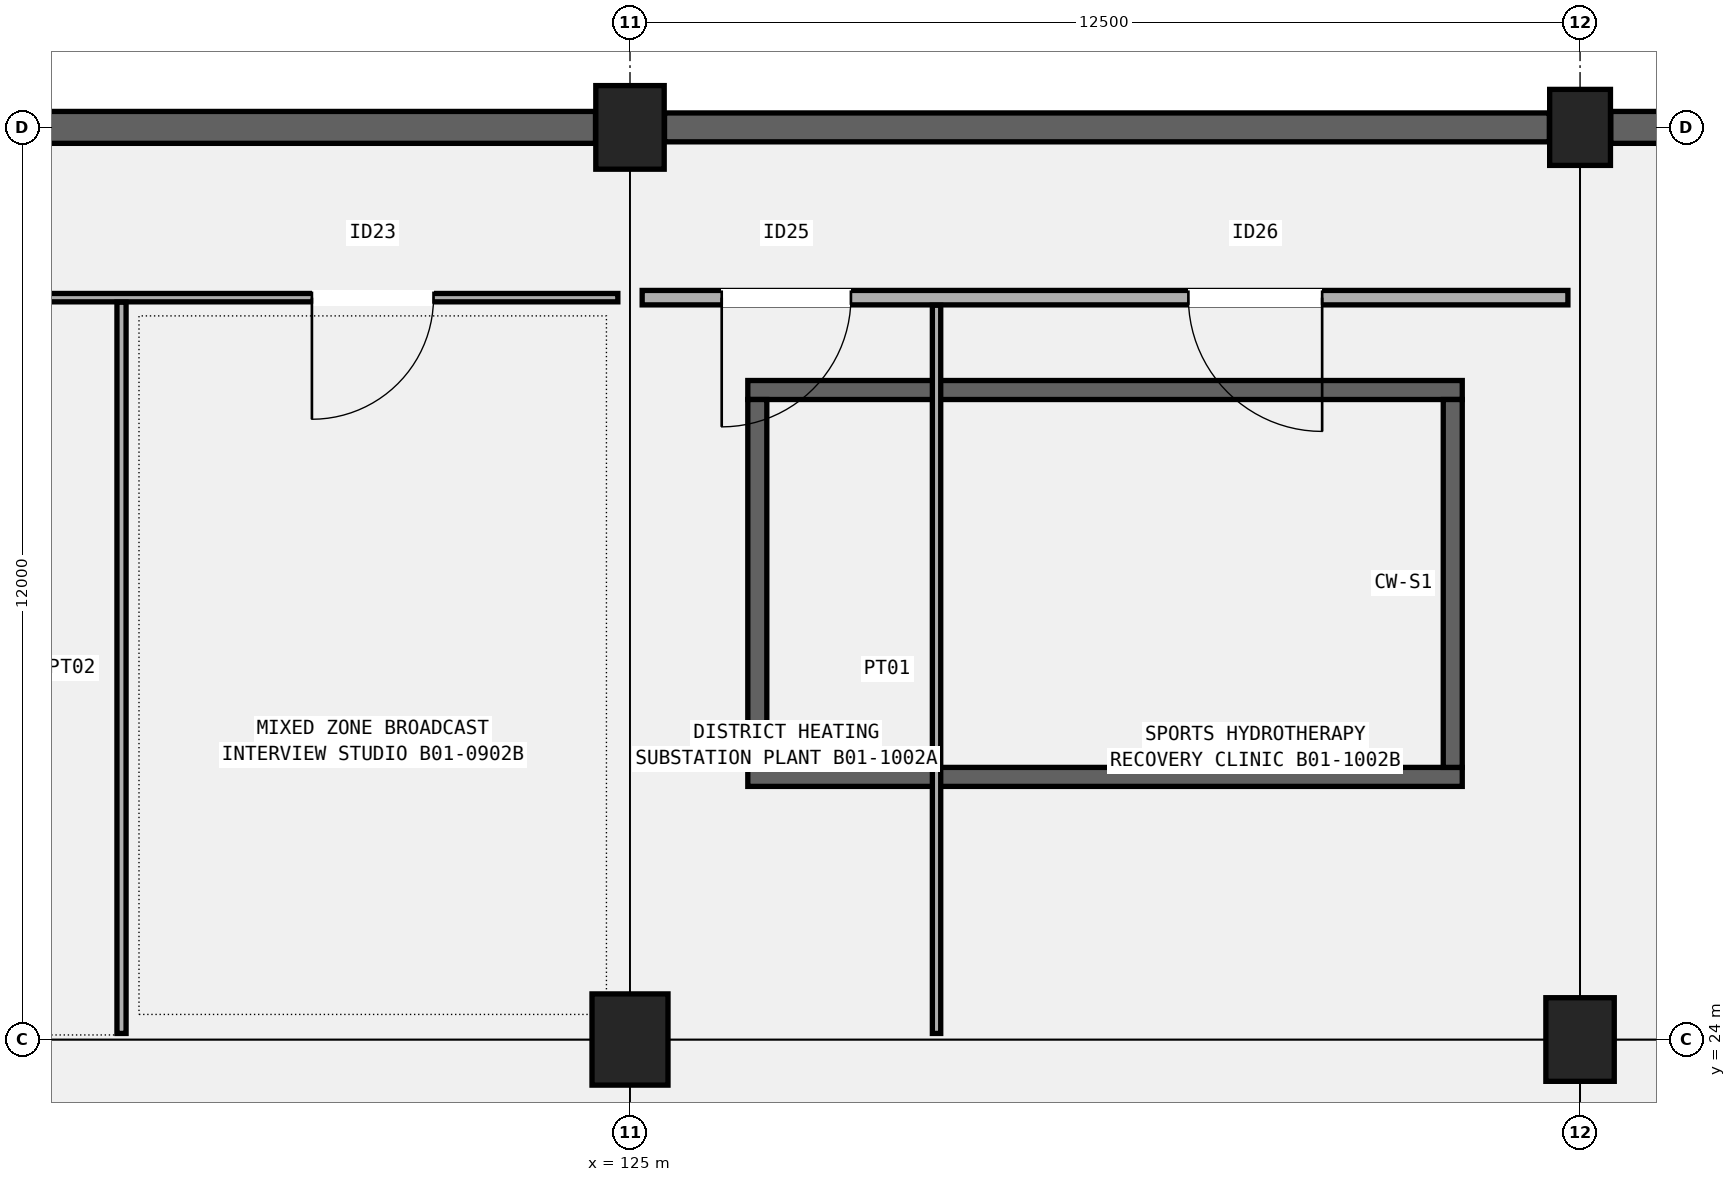
"""IFC4 building model, lengths in metres.
Left out: names, types, materials, properties, quantities, classifications, styles, units other than length and angle.
Written with IfcOpenShell. Run it as: python <this file> out.ifc"""

import sys

from ifc_helpers import new_model, si_unit, direction, frame, frame_2d, origin, origin_2d, place, context, subcontext, project, spatial, rectangle, extrude, element, fill, save


model = new_model("IFC4")
c1 = context("Model", 3, precision=1e-05, world=origin(), true_north=direction((0.0, 1.0)))
c2 = subcontext(c1, "Body", "Model", "MODEL_VIEW")
j1 = project(units=[si_unit("LENGTHUNIT", "METRE"), si_unit("PLANEANGLEUNIT", "RADIAN")], contexts=[c1])
p1 = place(None, origin())
s1 = spatial("IfcSite", under=j1, at=p1, CompositionType="ELEMENT")
p2 = place(p1, origin())
s2 = spatial("IfcBuilding", under=s1, at=p2, CompositionType="ELEMENT")
p3 = place(p2, frame((0.0, 0.0, -4.8)))
s3 = spatial("IfcBuildingStorey", under=s2, at=p3, CompositionType="ELEMENT", Elevation=-4.8)
p4 = place(p3, frame((125.0, 24.0, 0.0), z_axis=(0.0, 0.0, 1.0), x_axis=(1.0, 0.0, 0.0)))
e1 = element("IfcColumn", 1, at=p4, inside=s3, PredefinedType="COLUMN", context=c2, shape_type="SweptSolid", body=[
    extrude(rectangle(XDim=1.0, YDim=1.2, at=origin_2d()), origin(), (0.0, 0.0, 1.0), 4.8),
])
for number, where, z_axis, x_axis in (
    (2, (125.0, 36.0, 0.0), (0.0, 0.0, 1.0), (1.0, 0.0, 0.0)),
    (3, (137.5, 24.0, 0.0), (0.0, 0.0, 1.0), (1.0, 0.0, 0.0)),
):
    element("IfcColumn", number, at=place(p3, frame(where, z_axis=z_axis, x_axis=x_axis)), inside=s3, PredefinedType="COLUMN", context=c2, shape_type="SweptSolid", body=[
        extrude(rectangle(XDim=0.9, YDim=1.1, at=origin_2d()), origin(), (0.0, 0.0, 1.0), 4.8),
    ])
p5 = place(p3, frame((137.5, 36.0, 0.0), z_axis=(0.0, 0.0, 1.0), x_axis=(1.0, 0.0, 0.0)))
e4 = element("IfcColumn", 4, at=p5, inside=s3, PredefinedType="COLUMN", context=c2, shape_type="SweptSolid", body=[
    extrude(rectangle(XDim=0.8, YDim=1.0, at=origin_2d()), origin(), (0.0, 0.0, 1.0), 4.8),
])
p6 = place(p3, frame((112.504, 36.0, 0.0), z_axis=(0.0, 0.0, 1.0), x_axis=(1.0, 0.0, 0.0)))
e5 = element("IfcWall", 5, at=p6, inside=s3, PredefinedType="STANDARD", context=c2, shape_type="SweptSolid", body=[
    extrude(rectangle(XDim=12.042, YDim=0.42, at=frame_2d((6.021, 0.0))), origin(), (0.0, 0.0, 1.0), 4.46),
])
p7 = place(p3, frame((125.454, 36.0, 0.0), z_axis=(0.0, 0.0, 1.0), x_axis=(1.0, 0.0, 0.0)))
e6 = element("IfcWall", 6, at=p7, inside=s3, PredefinedType="STANDARD", context=c2, shape_type="SweptSolid", body=[
    extrude(rectangle(XDim=11.642, YDim=0.38, at=frame_2d((5.821, 0.0))), origin(), (0.0, 0.0, 1.0), 4.46),
])
p8 = place(p3, frame((137.904, 36.0, 0.0), z_axis=(0.0, 0.0, 1.0), x_axis=(1.0, 0.0, 0.0)))
e7 = element("IfcWall", 7, at=p8, inside=s3, PredefinedType="STANDARD", context=c2, shape_type="SweptSolid", body=[
    extrude(rectangle(XDim=11.667, YDim=0.42, at=frame_2d((5.833, 0.0))), origin(), (0.0, 0.0, 1.0), 4.46),
])
for number, where, z_axis, x_axis in (
    (8, (126.55, 27.455, 0.0), (0.0, 0.0, 1.0), (1.0, 0.0, 0.0)),
    (9, (126.55, 32.545, 0.0), (0.0, 0.0, 1.0), (1.0, 0.0, 0.0)),
):
    element("IfcWall", number, at=place(p3, frame(where, z_axis=z_axis, x_axis=x_axis)), inside=s3, PredefinedType="SHEAR", context=c2, shape_type="SweptSolid", body=[
        extrude(rectangle(XDim=9.4, YDim=0.25, at=frame_2d((4.7, 0.0))), origin(), (0.0, 0.0, 1.0), 4.5),
    ])
for number, where, z_axis, x_axis in (
    (10, (126.675, 27.58, 0.0), (0.0, 0.0, 1.0), (0.0, 1.0, 0.0)),
    (11, (135.825, 27.58, 0.0), (0.0, 0.0, 1.0), (0.0, 1.0, 0.0)),
):
    element("IfcWall", number, at=place(p3, frame(where, z_axis=z_axis, x_axis=x_axis)), inside=s3, PredefinedType="SHEAR", context=c2, shape_type="SweptSolid", body=[
        extrude(rectangle(XDim=4.84, YDim=0.25, at=frame_2d((2.42, 0.0))), origin(), (0.0, 0.0, 1.0), 4.5),
    ])
p9 = place(p3, frame((112.16, 33.76, 0.0), z_axis=(0.0, 0.0, 1.0), x_axis=(1.0, 0.0, 0.0)))
e12 = element("IfcWall", 12, at=p9, inside=s3, PredefinedType="PARTITIONING", context=c2, shape_type="SweptSolid", body=[
    extrude(rectangle(XDim=12.68, YDim=0.11, at=frame_2d((6.34, 0.0))), origin(), (0.0, 0.0, 1.0), 3.92),
])
p10 = place(p9, frame((3.815, 0.0, 0.0), z_axis=(0.0, 0.0, 1.0), x_axis=(-1.0, 0.0, 0.0)))
e13 = element("IfcOpeningElement", 13, at=p10, cuts=e12, PredefinedType="OPENING", context=c2, shape_type="SweptSolid", body=[
    extrude(rectangle(XDim=1.56, YDim=2.26, at=frame_2d((0.78, 1.13))), frame((0.0, 0.065, 0.0), z_axis=(0.0, -1.0, 0.0), x_axis=(1.0, 0.0, 0.0)), (0.0, 0.0, 1.0), 0.13),
])
p11 = place(p9, frame((10.255, 0.0, 0.0), z_axis=(0.0, 0.0, 1.0), x_axis=(-1.0, 0.0, 0.0)))
e14 = element("IfcOpeningElement", 14, at=p11, cuts=e12, PredefinedType="OPENING", context=c2, shape_type="SweptSolid", body=[
    extrude(rectangle(XDim=1.6, YDim=2.3, at=frame_2d((0.8, 1.15))), frame((0.0, 0.065, 0.0), z_axis=(0.0, -1.0, 0.0), x_axis=(1.0, 0.0, 0.0)), (0.0, 0.0, 1.0), 0.13),
])
p12 = place(p3, frame((118.31, 24.08, 0.0), z_axis=(0.0, 0.0, 1.0), x_axis=(0.0, 1.0, 0.0)))
e15 = element("IfcWall", 15, at=p12, inside=s3, PredefinedType="PARTITIONING", context=c2, shape_type="SweptSolid", body=[
    extrude(rectangle(XDim=9.62, YDim=0.12, at=frame_2d((4.81, 0.0))), origin(), (0.0, 0.0, 1.0), 3.92),
])
p13 = place(p3, frame((125.16, 33.76, 0.0), z_axis=(0.0, 0.0, 1.0), x_axis=(1.0, 0.0, 0.0)))
e16 = element("IfcWall", 16, at=p13, inside=s3, PredefinedType="PARTITIONING", context=c2, shape_type="SweptSolid", body=[
    extrude(rectangle(XDim=12.18, YDim=0.19, at=frame_2d((6.09, 0.0))), origin(), (0.0, 0.0, 1.0), 3.92),
])
p14 = place(p13, frame((2.747, 0.0, 0.0), z_axis=(0.0, 0.0, 1.0), x_axis=(-1.0, 0.0, 0.0)))
e17 = element("IfcOpeningElement", 17, at=p14, cuts=e16, PredefinedType="OPENING", context=c2, shape_type="SweptSolid", body=[
    extrude(rectangle(XDim=1.7, YDim=2.32, at=frame_2d((0.85, 1.16))), frame((0.0, 0.105, 0.0), z_axis=(0.0, -1.0, 0.0), x_axis=(1.0, 0.0, 0.0)), (0.0, 0.0, 1.0), 0.21),
])
p15 = place(p13, frame((8.947, 0.0, 0.0), z_axis=(0.0, 0.0, 1.0), x_axis=(-1.0, 0.0, 0.0)))
e18 = element("IfcOpeningElement", 18, at=p15, cuts=e16, PredefinedType="OPENING", context=c2, shape_type="SweptSolid", body=[
    extrude(rectangle(XDim=1.76, YDim=2.3, at=frame_2d((0.88, 1.15))), frame((0.0, 0.105, 0.0), z_axis=(0.0, -1.0, 0.0), x_axis=(1.0, 0.0, 0.0)), (0.0, 0.0, 1.0), 0.21),
])
p16 = place(p3, frame((129.033, 24.08, 0.0), z_axis=(0.0, 0.0, 1.0), x_axis=(0.0, 1.0, 0.0)))
e19 = element("IfcWall", 19, at=p16, inside=s3, PredefinedType="PARTITIONING", context=c2, shape_type="SweptSolid", body=[
    extrude(rectangle(XDim=9.58, YDim=0.11, at=frame_2d((4.79, 0.0))), origin(), (0.0, 0.0, 1.0), 3.92),
])
p17 = place(p11, origin())
e20 = element("IfcDoor", 20, at=p17, inside=s3, OperationType="SINGLE_SWING_RIGHT", PredefinedType="DOOR", context=c2, shape_type="SweptSolid", body=[
    extrude(rectangle(XDim=1.6, YDim=2.3, at=frame_2d((0.8, 1.15))), frame((0.0, 0.025, 0.0), z_axis=(0.0, -1.0, 0.0), x_axis=(1.0, 0.0, 0.0)), (0.0, 0.0, 1.0), 0.05),
])
fill(e14, e20)
p18 = place(p14, origin())
e21 = element("IfcDoor", 21, at=p18, inside=s3, OperationType="SINGLE_SWING_RIGHT", PredefinedType="DOOR", context=c2, shape_type="SweptSolid", body=[
    extrude(rectangle(XDim=1.7, YDim=2.32, at=frame_2d((0.85, 1.16))), frame((0.0, 0.025, 0.0), z_axis=(0.0, -1.0, 0.0), x_axis=(1.0, 0.0, 0.0)), (0.0, 0.0, 1.0), 0.05),
])
fill(e17, e21)
p19 = place(p15, origin())
e22 = element("IfcDoor", 22, at=p19, inside=s3, OperationType="SINGLE_SWING_LEFT", PredefinedType="DOOR", context=c2, shape_type="SweptSolid", body=[
    extrude(rectangle(XDim=1.76, YDim=2.3, at=frame_2d((0.88, 1.15))), frame((0.0, 0.025, 0.0), z_axis=(0.0, -1.0, 0.0), x_axis=(1.0, 0.0, 0.0)), (0.0, 0.0, 1.0), 0.05),
])
fill(e18, e22)
save(model, sys.argv[1])
